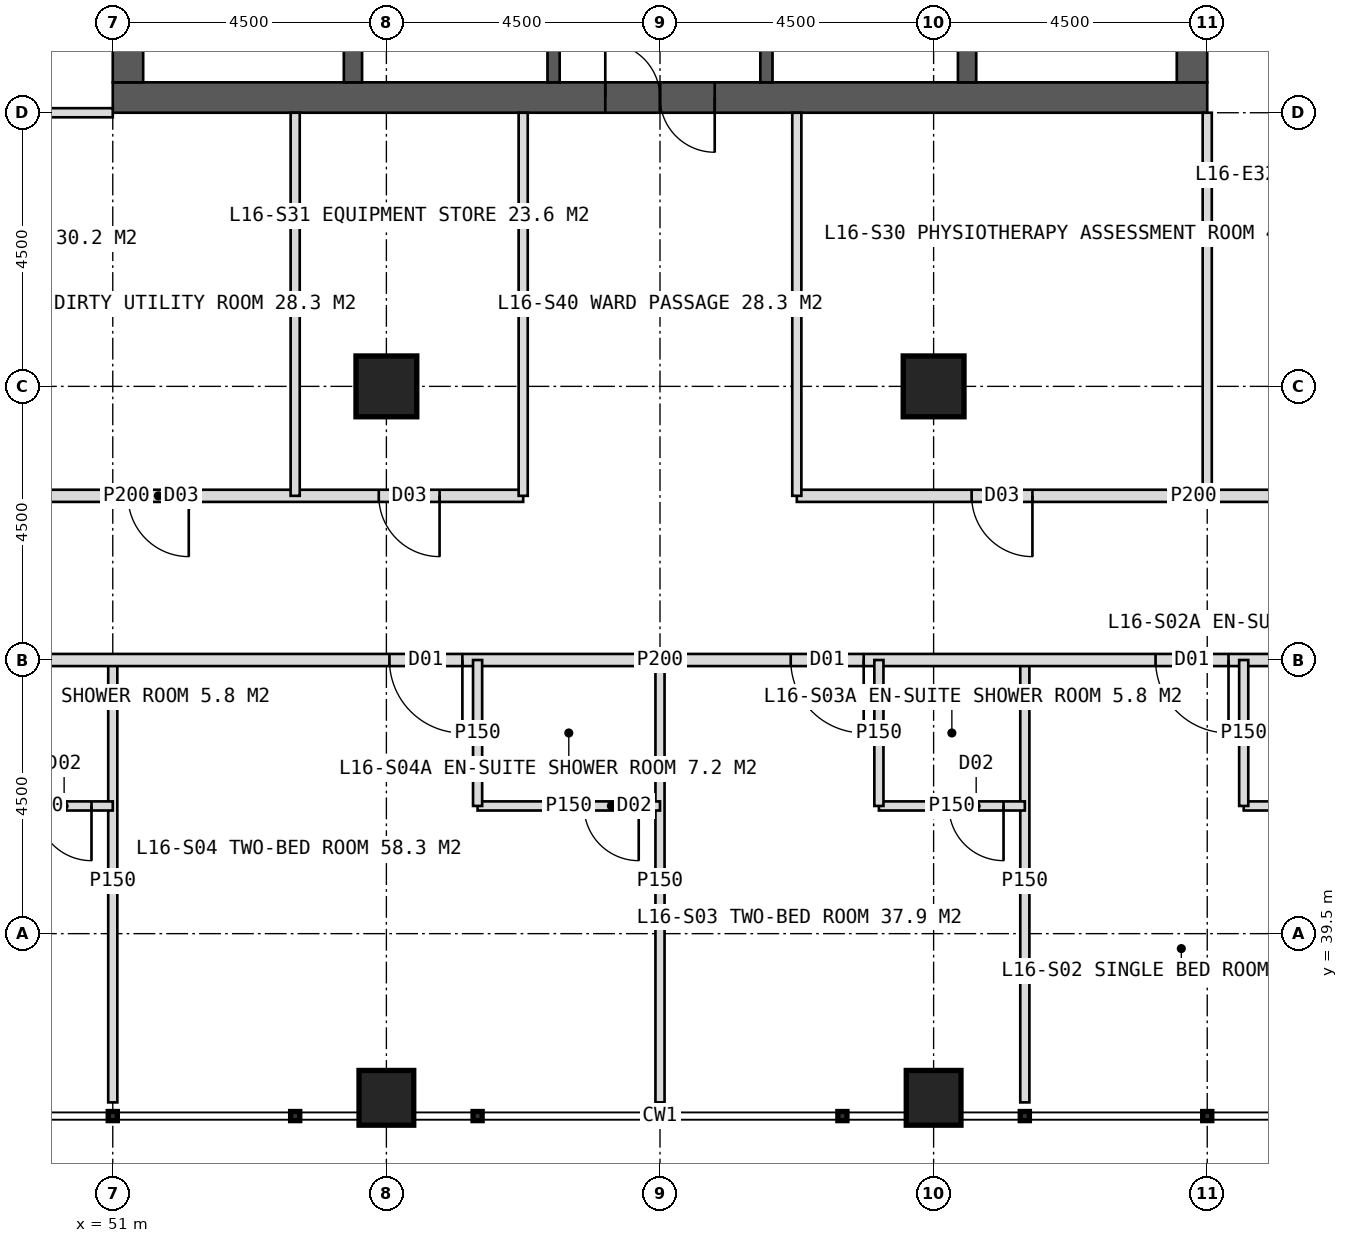
"""IFC4 building model, lengths in metres.
Left out: names, types, materials, properties, quantities, classifications, styles, units other than length and angle.
Written with IfcOpenShell. Run it as: python <this file> out.ifc"""

import sys

from ifc_helpers import new_model, si_unit, direction, frame, frame_2d, origin, origin_2d, place, context, subcontext, project, spatial, rectangle, hollow_rectangle, extrude, element, fill, save


model = new_model("IFC4")
c1 = context("Model", 3, precision=1e-05, world=origin(), true_north=direction((0.0, 1.0)))
c2 = subcontext(c1, "Body", "Model", "MODEL_VIEW")
j1 = project(units=[si_unit("LENGTHUNIT", "METRE"), si_unit("PLANEANGLEUNIT", "RADIAN")], contexts=[c1])
p1 = place(None, origin())
s1 = spatial("IfcSite", under=j1, at=p1, CompositionType="ELEMENT")
p2 = place(p1, origin())
s2 = spatial("IfcBuilding", under=s1, at=p2, CompositionType="ELEMENT")
p3 = place(p2, frame((0.0, 0.0, 71.0)))
s3 = spatial("IfcBuildingStorey", under=s2, at=p3, CompositionType="ELEMENT", Elevation=71.0)
p4 = place(p3, frame((51.0, 53.25, 0.0), z_axis=(0.0, 0.0, 1.0), x_axis=(1.0, 0.0, 0.0)))
e1 = element("IfcWall", 1, at=p4, inside=s3, PredefinedType="SHEAR", context=c2, shape_type="SweptSolid", body=[
    extrude(rectangle(XDim=18.0, YDim=0.5, at=frame_2d((9.0, 0.0))), origin(), (0.0, 0.0, 1.0), 4.0),
])
p5 = place(p4, frame((8.1, 0.0, 0.0)))
e2 = element("IfcOpeningElement", 2, at=p5, cuts=e1, PredefinedType="OPENING", context=c2, shape_type="SweptSolid", body=[
    extrude(rectangle(XDim=1.8, YDim=2.2, at=frame_2d((0.9, 1.1))), frame((0.0, 0.26, 0.0), z_axis=(0.0, -1.0, 0.0), x_axis=(1.0, 0.0, 0.0)), (0.0, 0.0, 1.0), 0.52),
])
p6 = place(p3, frame((51.25, 53.5, 0.0), z_axis=(0.0, 0.0, 1.0), x_axis=(0.0, 1.0, 0.0)))
e3 = element("IfcWall", 3, at=p6, inside=s3, PredefinedType="SHEAR", context=c2, shape_type="SweptSolid", body=[
    extrude(rectangle(XDim=17.0, YDim=0.5, at=frame_2d((8.5, 0.0))), origin(), (0.0, 0.0, 1.0), 4.0),
])
p7 = place(p6, frame((6.0, 0.0, 0.0)))
e4 = element("IfcOpeningElement", 4, at=p7, cuts=e3, PredefinedType="OPENING", context=c2, shape_type="SweptSolid", body=[
    extrude(rectangle(XDim=1.5, YDim=2.2, at=frame_2d((0.75, 1.1))), frame((0.0, 0.26, 0.0), z_axis=(0.0, -1.0, 0.0), x_axis=(1.0, 0.0, 0.0)), (0.0, 0.0, 1.0), 0.52),
])
p8 = place(p3, frame((68.75, 53.5, 0.0), z_axis=(0.0, 0.0, 1.0), x_axis=(0.0, 1.0, 0.0)))
e5 = element("IfcWall", 5, at=p8, inside=s3, PredefinedType="SHEAR", context=c2, shape_type="SweptSolid", body=[
    extrude(rectangle(XDim=17.0, YDim=0.5, at=frame_2d((8.5, 0.0))), origin(), (0.0, 0.0, 1.0), 4.0),
])
p9 = place(p8, frame((9.5, 0.0, 0.0)))
e6 = element("IfcOpeningElement", 6, at=p9, cuts=e5, PredefinedType="OPENING", context=c2, shape_type="SweptSolid", body=[
    extrude(rectangle(XDim=1.5, YDim=2.2, at=frame_2d((0.75, 1.1))), frame((0.0, 0.26, 0.0), z_axis=(0.0, -1.0, 0.0), x_axis=(1.0, 0.0, 0.0)), (0.0, 0.0, 1.0), 0.52),
])
for number, where, z_axis, x_axis in (
    (7, (54.95, 53.5, 0.0), (0.0, 0.0, 1.0), (0.0, 1.0, 0.0)),
    (8, (65.05, 53.5, 0.0), (0.0, 0.0, 1.0), (0.0, 1.0, 0.0)),
):
    element("IfcWall", number, at=place(p3, frame(where, z_axis=z_axis, x_axis=x_axis)), inside=s3, PredefinedType="SHEAR", context=c2, shape_type="SweptSolid", body=[
        extrude(rectangle(XDim=17.0, YDim=0.3, at=frame_2d((8.5, 0.0))), origin(), (0.0, 0.0, 1.0), 4.0),
    ])
p10 = place(p3, frame((58.25, 53.5, 0.0), z_axis=(0.0, 0.0, 1.0), x_axis=(0.0, 1.0, 0.0)))
e9 = element("IfcWall", 9, at=p10, inside=s3, PredefinedType="SHEAR", context=c2, shape_type="SweptSolid", body=[
    extrude(rectangle(XDim=17.0, YDim=0.2, at=frame_2d((8.5, 0.0))), origin(), (0.0, 0.0, 1.0), 4.0),
])
p11 = place(p10, frame((1.375, 0.0, 0.0)))
e10 = element("IfcOpeningElement", 10, at=p11, cuts=e9, PredefinedType="OPENING", context=c2, shape_type="SweptSolid", body=[
    extrude(rectangle(XDim=1.4, YDim=2.2, at=frame_2d((0.7, 1.1))), frame((0.0, 0.11, 0.0), z_axis=(0.0, -1.0, 0.0), x_axis=(1.0, 0.0, 0.0)), (0.0, 0.0, 1.0), 0.22),
])
p12 = place(p10, frame((5.675, 0.0, 0.0)))
e11 = element("IfcOpeningElement", 11, at=p12, cuts=e9, PredefinedType="OPENING", context=c2, shape_type="SweptSolid", body=[
    extrude(rectangle(XDim=1.4, YDim=2.2, at=frame_2d((0.7, 1.1))), frame((0.0, 0.11, 0.0), z_axis=(0.0, -1.0, 0.0), x_axis=(1.0, 0.0, 0.0)), (0.0, 0.0, 1.0), 0.22),
])
p13 = place(p3, frame((61.75, 53.5, 0.0), z_axis=(0.0, 0.0, 1.0), x_axis=(0.0, 1.0, 0.0)))
e12 = element("IfcWall", 12, at=p13, inside=s3, PredefinedType="SHEAR", context=c2, shape_type="SweptSolid", body=[
    extrude(rectangle(XDim=17.0, YDim=0.2, at=frame_2d((8.5, 0.0))), origin(), (0.0, 0.0, 1.0), 4.0),
])
p14 = place(p13, frame((1.375, 0.0, 0.0)))
e13 = element("IfcOpeningElement", 13, at=p14, cuts=e12, PredefinedType="OPENING", context=c2, shape_type="SweptSolid", body=[
    extrude(rectangle(XDim=1.4, YDim=2.2, at=frame_2d((0.7, 1.1))), frame((0.0, 0.11, 0.0), z_axis=(0.0, -1.0, 0.0), x_axis=(1.0, 0.0, 0.0)), (0.0, 0.0, 1.0), 0.22),
])
p15 = place(p13, frame((5.675, 0.0, 0.0)))
e14 = element("IfcOpeningElement", 14, at=p15, cuts=e12, PredefinedType="OPENING", context=c2, shape_type="SweptSolid", body=[
    extrude(rectangle(XDim=1.4, YDim=2.2, at=frame_2d((0.7, 1.1))), frame((0.0, 0.11, 0.0), z_axis=(0.0, -1.0, 0.0), x_axis=(1.0, 0.0, 0.0)), (0.0, 0.0, 1.0), 0.22),
])
for number, where, z_axis, x_axis in (
    (15, (55.5, 48.5, 0.0), (0.0, 0.0, 1.0), (1.0, 0.0, 0.0)),
    (16, (64.5, 48.5, 0.0), (0.0, 0.0, 1.0), (1.0, 0.0, 0.0)),
):
    element("IfcColumn", number, at=place(p3, frame(where, z_axis=z_axis, x_axis=x_axis)), inside=s3, PredefinedType="COLUMN", context=c2, shape_type="SweptSolid", body=[
        extrude(hollow_rectangle(XDim=1.0, YDim=1.0, WallThickness=0.1, at=origin_2d()), origin(), (0.0, 0.0, 1.0), 4.0),
    ])
for number, where, z_axis, x_axis in (
    (17, (55.5, 36.8, 0.0), (0.0, 0.0, 1.0), (1.0, 0.0, 0.0)),
    (18, (64.5, 36.8, 0.0), (0.0, 0.0, 1.0), (1.0, 0.0, 0.0)),
):
    element("IfcColumn", number, at=place(p3, frame(where, z_axis=z_axis, x_axis=x_axis)), inside=s3, PredefinedType="COLUMN", context=c2, shape_type="SweptSolid", body=[
        extrude(hollow_rectangle(XDim=0.9, YDim=0.9, WallThickness=0.08, at=origin_2d()), origin(), (0.0, 0.0, 1.0), 4.0),
    ])
p16 = place(p3, frame((51.0, 53.0, 0.0), z_axis=(0.0, 0.0, 1.0), x_axis=(-1.0, 0.0, 0.0)))
e19 = element("IfcWall", 19, at=p16, inside=s3, PredefinedType="PARTITIONING", context=c2, shape_type="SweptSolid", body=[
    extrude(rectangle(XDim=6.3, YDim=0.15, at=frame_2d((3.15, 0.0))), origin(), (0.0, 0.0, 1.0), 3.75),
])
p17 = place(p3, frame((66.0, 44.0, 0.0), z_axis=(0.0, 0.0, 1.0), x_axis=(0.0, -1.0, 0.0)))
e20 = element("IfcWall", 20, at=p17, inside=s3, PredefinedType="PARTITIONING", context=c2, shape_type="SweptSolid", body=[
    extrude(rectangle(XDim=7.275, YDim=0.15, at=frame_2d((3.637, 0.0))), origin(), (0.0, 0.0, 1.0), 3.75),
])
p18 = place(p3, frame((60.0, 44.0, 0.0), z_axis=(0.0, 0.0, 1.0), x_axis=(0.0, -1.0, 0.0)))
e21 = element("IfcWall", 21, at=p18, inside=s3, PredefinedType="PARTITIONING", context=c2, shape_type="SweptSolid", body=[
    extrude(rectangle(XDim=7.275, YDim=0.15, at=frame_2d((3.637, 0.0))), origin(), (0.0, 0.0, 1.0), 2.75),
])
p19 = place(p3, frame((51.0, 44.0, 0.0), z_axis=(0.0, 0.0, 1.0), x_axis=(0.0, -1.0, 0.0)))
e22 = element("IfcWall", 22, at=p19, inside=s3, PredefinedType="PARTITIONING", context=c2, shape_type="SweptSolid", body=[
    extrude(rectangle(XDim=7.275, YDim=0.15, at=frame_2d((3.637, 0.0))), origin(), (0.0, 0.0, 1.0), 3.75),
])
p20 = place(p3, frame((78.0, 44.0, 0.0), z_axis=(0.0, 0.0, 1.0), x_axis=(-1.0, 0.0, 0.0)))
e23 = element("IfcWall", 23, at=p20, inside=s3, PredefinedType="PARTITIONING", context=c2, shape_type="SweptSolid", body=[
    extrude(rectangle(XDim=36.0, YDim=0.2, at=frame_2d((18.0, 0.0))), origin(), (0.0, 0.0, 1.0), 3.75),
])
p21 = place(p20, frame((2.65, 0.0, 0.0)))
e24 = element("IfcOpeningElement", 24, at=p21, cuts=e23, PredefinedType="OPENING", context=c2, shape_type="SweptSolid", body=[
    extrude(rectangle(XDim=1.2, YDim=2.2, at=frame_2d((0.6, 1.1))), frame((0.0, 0.11, 0.0), z_axis=(0.0, -1.0, 0.0), x_axis=(1.0, 0.0, 0.0)), (0.0, 0.0, 1.0), 0.22),
])
p22 = place(p20, frame((8.65, 0.0, 0.0)))
e25 = element("IfcOpeningElement", 25, at=p22, cuts=e23, PredefinedType="OPENING", context=c2, shape_type="SweptSolid", body=[
    extrude(rectangle(XDim=1.2, YDim=2.2, at=frame_2d((0.6, 1.1))), frame((0.0, 0.11, 0.0), z_axis=(0.0, -1.0, 0.0), x_axis=(1.0, 0.0, 0.0)), (0.0, 0.0, 1.0), 0.22),
])
p23 = place(p20, frame((14.65, 0.0, 0.0)))
e26 = element("IfcOpeningElement", 26, at=p23, cuts=e23, PredefinedType="OPENING", context=c2, shape_type="SweptSolid", body=[
    extrude(rectangle(XDim=1.2, YDim=2.2, at=frame_2d((0.6, 1.1))), frame((0.0, 0.11, 0.0), z_axis=(0.0, -1.0, 0.0), x_axis=(1.0, 0.0, 0.0)), (0.0, 0.0, 1.0), 0.22),
])
p24 = place(p20, frame((21.25, 0.0, 0.0)))
e27 = element("IfcOpeningElement", 27, at=p24, cuts=e23, PredefinedType="OPENING", context=c2, shape_type="SweptSolid", body=[
    extrude(rectangle(XDim=1.2, YDim=2.2, at=frame_2d((0.6, 1.1))), frame((0.0, 0.11, 0.0), z_axis=(0.0, -1.0, 0.0), x_axis=(1.0, 0.0, 0.0)), (0.0, 0.0, 1.0), 0.22),
])
p25 = place(p20, frame((29.65, 0.0, 0.0)))
e28 = element("IfcOpeningElement", 28, at=p25, cuts=e23, PredefinedType="OPENING", context=c2, shape_type="SweptSolid", body=[
    extrude(rectangle(XDim=1.2, YDim=2.2, at=frame_2d((0.6, 1.1))), frame((0.0, 0.11, 0.0), z_axis=(0.0, -1.0, 0.0), x_axis=(1.0, 0.0, 0.0)), (0.0, 0.0, 1.0), 0.22),
])
p26 = place(p3, frame((72.0, 41.6, 0.0), z_axis=(0.0, 0.0, 1.0), x_axis=(-1.0, 0.0, 0.0)))
e29 = element("IfcWall", 29, at=p26, inside=s3, PredefinedType="PARTITIONING", context=c2, shape_type="SweptSolid", body=[
    extrude(rectangle(XDim=2.4, YDim=0.15, at=frame_2d((1.2, 0.0))), origin(), (0.0, 0.0, 1.0), 3.75),
])
p27 = place(p26, frame((0.35, 0.0, 0.0)))
e30 = element("IfcOpeningElement", 30, at=p27, cuts=e29, PredefinedType="OPENING", context=c2, shape_type="SweptSolid", body=[
    extrude(rectangle(XDim=0.9, YDim=2.1, at=frame_2d((0.45, 1.05))), frame((0.0, 0.085, 0.0), z_axis=(0.0, -1.0, 0.0), x_axis=(1.0, 0.0, 0.0)), (0.0, 0.0, 1.0), 0.17),
])
p28 = place(p3, frame((69.6, 44.0, 0.0), z_axis=(0.0, 0.0, 1.0), x_axis=(0.0, -1.0, 0.0)))
e31 = element("IfcWall", 31, at=p28, inside=s3, PredefinedType="PARTITIONING", context=c2, shape_type="SweptSolid", body=[
    extrude(rectangle(XDim=2.4, YDim=0.15, at=frame_2d((1.2, 0.0))), origin(), (0.0, 0.0, 1.0), 3.75),
])
p29 = place(p3, frame((66.0, 41.6, 0.0), z_axis=(0.0, 0.0, 1.0), x_axis=(-1.0, 0.0, 0.0)))
e32 = element("IfcWall", 32, at=p29, inside=s3, PredefinedType="PARTITIONING", context=c2, shape_type="SweptSolid", body=[
    extrude(rectangle(XDim=2.4, YDim=0.15, at=frame_2d((1.2, 0.0))), origin(), (0.0, 0.0, 1.0), 3.75),
])
p30 = place(p29, frame((0.35, 0.0, 0.0)))
e33 = element("IfcOpeningElement", 33, at=p30, cuts=e32, PredefinedType="OPENING", context=c2, shape_type="SweptSolid", body=[
    extrude(rectangle(XDim=0.9, YDim=2.1, at=frame_2d((0.45, 1.05))), frame((0.0, 0.085, 0.0), z_axis=(0.0, -1.0, 0.0), x_axis=(1.0, 0.0, 0.0)), (0.0, 0.0, 1.0), 0.17),
])
p31 = place(p3, frame((63.6, 44.0, 0.0), z_axis=(0.0, 0.0, 1.0), x_axis=(0.0, -1.0, 0.0)))
e34 = element("IfcWall", 34, at=p31, inside=s3, PredefinedType="PARTITIONING", context=c2, shape_type="SweptSolid", body=[
    extrude(rectangle(XDim=2.4, YDim=0.15, at=frame_2d((1.2, 0.0))), origin(), (0.0, 0.0, 1.0), 3.75),
])
p32 = place(p3, frame((60.0, 41.6, 0.0), z_axis=(0.0, 0.0, 1.0), x_axis=(-1.0, 0.0, 0.0)))
e35 = element("IfcWall", 35, at=p32, inside=s3, PredefinedType="PARTITIONING", context=c2, shape_type="SweptSolid", body=[
    extrude(rectangle(XDim=3.0, YDim=0.15, at=frame_2d((1.5, 0.0))), origin(), (0.0, 0.0, 1.0), 3.75),
])
p33 = place(p32, frame((0.35, 0.0, 0.0)))
e36 = element("IfcOpeningElement", 36, at=p33, cuts=e35, PredefinedType="OPENING", context=c2, shape_type="SweptSolid", body=[
    extrude(rectangle(XDim=0.9, YDim=2.1, at=frame_2d((0.45, 1.05))), frame((0.0, 0.085, 0.0), z_axis=(0.0, -1.0, 0.0), x_axis=(1.0, 0.0, 0.0)), (0.0, 0.0, 1.0), 0.17),
])
p34 = place(p3, frame((57.0, 44.0, 0.0), z_axis=(0.0, 0.0, 1.0), x_axis=(0.0, -1.0, 0.0)))
e37 = element("IfcWall", 37, at=p34, inside=s3, PredefinedType="PARTITIONING", context=c2, shape_type="SweptSolid", body=[
    extrude(rectangle(XDim=2.4, YDim=0.15, at=frame_2d((1.2, 0.0))), origin(), (0.0, 0.0, 1.0), 3.75),
])
p35 = place(p3, frame((51.0, 41.6, 0.0), z_axis=(0.0, 0.0, 1.0), x_axis=(-1.0, 0.0, 0.0)))
e38 = element("IfcWall", 38, at=p35, inside=s3, PredefinedType="PARTITIONING", context=c2, shape_type="SweptSolid", body=[
    extrude(rectangle(XDim=2.4, YDim=0.15, at=frame_2d((1.2, 0.0))), origin(), (0.0, 0.0, 1.0), 3.75),
])
p36 = place(p35, frame((0.35, 0.0, 0.0)))
e39 = element("IfcOpeningElement", 39, at=p36, cuts=e38, PredefinedType="OPENING", context=c2, shape_type="SweptSolid", body=[
    extrude(rectangle(XDim=0.9, YDim=2.1, at=frame_2d((0.45, 1.05))), frame((0.0, 0.085, 0.0), z_axis=(0.0, -1.0, 0.0), x_axis=(1.0, 0.0, 0.0)), (0.0, 0.0, 1.0), 0.17),
])
p37 = place(p3, frame((69.0, 53.0, 0.0), z_axis=(0.0, 0.0, 1.0), x_axis=(0.0, -1.0, 0.0)))
e40 = element("IfcWall", 40, at=p37, inside=s3, PredefinedType="PARTITIONING", context=c2, shape_type="SweptSolid", body=[
    extrude(rectangle(XDim=6.3, YDim=0.15, at=frame_2d((3.15, 0.0))), origin(), (0.0, 0.0, 1.0), 3.75),
])
p38 = place(p3, frame((75.3, 46.7, 0.0), z_axis=(0.0, 0.0, 1.0), x_axis=(-1.0, 0.0, 0.0)))
e41 = element("IfcWall", 41, at=p38, inside=s3, PredefinedType="PARTITIONING", context=c2, shape_type="SweptSolid", body=[
    extrude(rectangle(XDim=13.05, YDim=0.2, at=frame_2d((6.525, 0.0))), origin(), (0.0, 0.0, 1.0), 3.75),
])
p39 = place(p38, frame((9.175, 0.0, 0.0)))
e42 = element("IfcOpeningElement", 42, at=p39, cuts=e41, PredefinedType="OPENING", context=c2, shape_type="SweptSolid", body=[
    extrude(rectangle(XDim=1.0, YDim=2.1, at=frame_2d((0.5, 1.05))), frame((0.0, 0.11, 0.0), z_axis=(0.0, -1.0, 0.0), x_axis=(1.0, 0.0, 0.0)), (0.0, 0.0, 1.0), 0.22),
])
p40 = place(p3, frame((57.75, 46.7, 0.0), z_axis=(0.0, 0.0, 1.0), x_axis=(-1.0, 0.0, 0.0)))
e43 = element("IfcWall", 43, at=p40, inside=s3, PredefinedType="PARTITIONING", context=c2, shape_type="SweptSolid", body=[
    extrude(rectangle(XDim=13.05, YDim=0.2, at=frame_2d((6.525, 0.0))), origin(), (0.0, 0.0, 1.0), 3.75),
])
p41 = place(p40, frame((1.375, 0.0, 0.0)))
e44 = element("IfcOpeningElement", 44, at=p41, cuts=e43, PredefinedType="OPENING", context=c2, shape_type="SweptSolid", body=[
    extrude(rectangle(XDim=1.0, YDim=2.1, at=frame_2d((0.5, 1.05))), frame((0.0, 0.11, 0.0), z_axis=(0.0, -1.0, 0.0), x_axis=(1.0, 0.0, 0.0)), (0.0, 0.0, 1.0), 0.22),
])
p42 = place(p40, frame((5.5, 0.0, 0.0)))
e45 = element("IfcOpeningElement", 45, at=p42, cuts=e43, PredefinedType="OPENING", context=c2, shape_type="SweptSolid", body=[
    extrude(rectangle(XDim=1.0, YDim=2.1, at=frame_2d((0.5, 1.05))), frame((0.0, 0.11, 0.0), z_axis=(0.0, -1.0, 0.0), x_axis=(1.0, 0.0, 0.0)), (0.0, 0.0, 1.0), 0.22),
])
p43 = place(p40, frame((10.15, 0.0, 0.0)))
e46 = element("IfcOpeningElement", 46, at=p43, cuts=e43, PredefinedType="OPENING", context=c2, shape_type="SweptSolid", body=[
    extrude(rectangle(XDim=1.0, YDim=2.1, at=frame_2d((0.5, 1.05))), frame((0.0, 0.11, 0.0), z_axis=(0.0, -1.0, 0.0), x_axis=(1.0, 0.0, 0.0)), (0.0, 0.0, 1.0), 0.22),
])
for number, where, z_axis, x_axis in (
    (47, (62.25, 53.0, 0.0), (0.0, 0.0, 1.0), (0.0, -1.0, 0.0)),
    (48, (57.75, 53.0, 0.0), (0.0, 0.0, 1.0), (0.0, -1.0, 0.0)),
    (49, (54.0, 53.0, 0.0), (0.0, 0.0, 1.0), (0.0, -1.0, 0.0)),
):
    element("IfcWall", number, at=place(p3, frame(where, z_axis=z_axis, x_axis=x_axis)), inside=s3, PredefinedType="PARTITIONING", context=c2, shape_type="SweptSolid", body=[
        extrude(rectangle(XDim=6.3, YDim=0.15, at=frame_2d((3.15, 0.0))), origin(), (0.0, 0.0, 1.0), 3.75),
    ])
p44 = place(p22, origin())
e50 = element("IfcDoor", 50, at=p44, inside=s3, OperationType="SINGLE_SWING_LEFT", PredefinedType="DOOR", context=c2, shape_type="SweptSolid", body=[
    extrude(rectangle(XDim=1.2, YDim=2.2, at=frame_2d((0.6, 1.1))), frame((0.0, 0.025, 0.0), z_axis=(0.0, -1.0, 0.0), x_axis=(1.0, 0.0, 0.0)), (0.0, 0.0, 1.0), 0.05),
])
fill(e25, e50)
p45 = place(p23, origin())
e51 = element("IfcDoor", 51, at=p45, inside=s3, OperationType="SINGLE_SWING_LEFT", PredefinedType="DOOR", context=c2, shape_type="SweptSolid", body=[
    extrude(rectangle(XDim=1.2, YDim=2.2, at=frame_2d((0.6, 1.1))), frame((0.0, 0.025, 0.0), z_axis=(0.0, -1.0, 0.0), x_axis=(1.0, 0.0, 0.0)), (0.0, 0.0, 1.0), 0.05),
])
fill(e26, e51)
p46 = place(p30, origin())
e52 = element("IfcDoor", 52, at=p46, inside=s3, OperationType="SINGLE_SWING_LEFT", PredefinedType="DOOR", context=c2, shape_type="SweptSolid", body=[
    extrude(rectangle(XDim=0.9, YDim=2.1, at=frame_2d((0.45, 1.05))), frame((0.0, 0.025, 0.0), z_axis=(0.0, -1.0, 0.0), x_axis=(1.0, 0.0, 0.0)), (0.0, 0.0, 1.0), 0.05),
])
fill(e33, e52)
p47 = place(p24, origin())
e53 = element("IfcDoor", 53, at=p47, inside=s3, OperationType="SINGLE_SWING_LEFT", PredefinedType="DOOR", context=c2, shape_type="SweptSolid", body=[
    extrude(rectangle(XDim=1.2, YDim=2.2, at=frame_2d((0.6, 1.1))), frame((0.0, 0.025, 0.0), z_axis=(0.0, -1.0, 0.0), x_axis=(1.0, 0.0, 0.0)), (0.0, 0.0, 1.0), 0.05),
])
fill(e27, e53)
p48 = place(p33, origin())
e54 = element("IfcDoor", 54, at=p48, inside=s3, OperationType="SINGLE_SWING_LEFT", PredefinedType="DOOR", context=c2, shape_type="SweptSolid", body=[
    extrude(rectangle(XDim=0.9, YDim=2.1, at=frame_2d((0.45, 1.05))), frame((0.0, 0.025, 0.0), z_axis=(0.0, -1.0, 0.0), x_axis=(1.0, 0.0, 0.0)), (0.0, 0.0, 1.0), 0.05),
])
fill(e36, e54)
p49 = place(p36, origin())
e55 = element("IfcDoor", 55, at=p49, inside=s3, OperationType="SINGLE_SWING_LEFT", PredefinedType="DOOR", context=c2, shape_type="SweptSolid", body=[
    extrude(rectangle(XDim=0.9, YDim=2.1, at=frame_2d((0.45, 1.05))), frame((0.0, 0.025, 0.0), z_axis=(0.0, -1.0, 0.0), x_axis=(1.0, 0.0, 0.0)), (0.0, 0.0, 1.0), 0.05),
])
fill(e39, e55)
p50 = place(p39, origin())
e56 = element("IfcDoor", 56, at=p50, inside=s3, OperationType="SINGLE_SWING_LEFT", PredefinedType="DOOR", context=c2, shape_type="SweptSolid", body=[
    extrude(rectangle(XDim=1.0, YDim=2.1, at=frame_2d((0.5, 1.05))), frame((0.0, 0.025, 0.0), z_axis=(0.0, -1.0, 0.0), x_axis=(1.0, 0.0, 0.0)), (0.0, 0.0, 1.0), 0.05),
])
fill(e42, e56)
p51 = place(p41, origin())
e57 = element("IfcDoor", 57, at=p51, inside=s3, OperationType="SINGLE_SWING_LEFT", PredefinedType="DOOR", context=c2, shape_type="SweptSolid", body=[
    extrude(rectangle(XDim=1.0, YDim=2.1, at=frame_2d((0.5, 1.05))), frame((0.0, 0.025, 0.0), z_axis=(0.0, -1.0, 0.0), x_axis=(1.0, 0.0, 0.0)), (0.0, 0.0, 1.0), 0.05),
])
fill(e44, e57)
p52 = place(p42, origin())
e58 = element("IfcDoor", 58, at=p52, inside=s3, OperationType="SINGLE_SWING_LEFT", PredefinedType="DOOR", context=c2, shape_type="SweptSolid", body=[
    extrude(rectangle(XDim=1.0, YDim=2.1, at=frame_2d((0.5, 1.05))), frame((0.0, 0.025, 0.0), z_axis=(0.0, -1.0, 0.0), x_axis=(1.0, 0.0, 0.0)), (0.0, 0.0, 1.0), 0.05),
])
fill(e45, e58)
p53 = place(p5, origin())
e59 = element("IfcDoor", 59, at=p53, inside=s3, OperationType="DOUBLE_DOOR_SINGLE_SWING", PredefinedType="DOOR", context=c2, shape_type="SweptSolid", body=[
    extrude(rectangle(XDim=1.8, YDim=2.2, at=frame_2d((0.9, 1.1))), frame((0.0, 0.025, 0.0), z_axis=(0.0, -1.0, 0.0), x_axis=(1.0, 0.0, 0.0)), (0.0, 0.0, 1.0), 0.05),
])
fill(e2, e59)
save(model, sys.argv[1])
